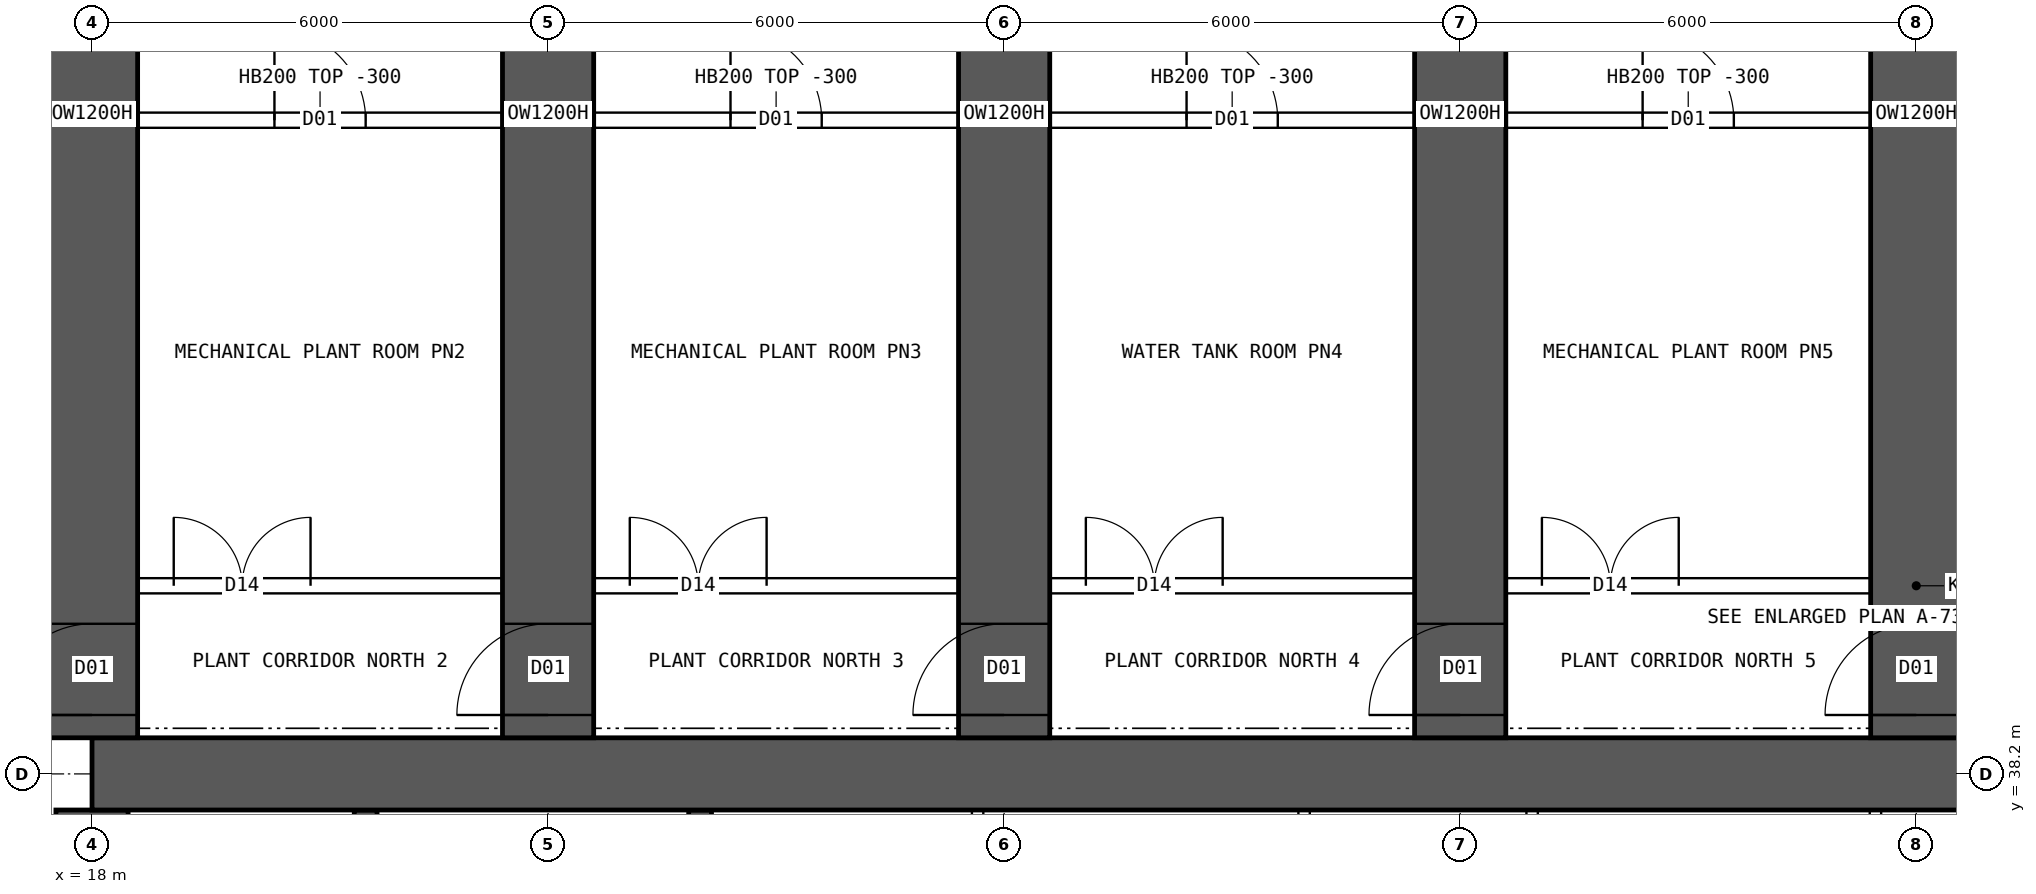
"""IFC4 building model, lengths in metres.
Left out: names, types, materials, properties, quantities, classifications, styles, units other than length and angle.
Written with IfcOpenShell. Run it as: python <this file> out.ifc"""

import sys

from ifc_helpers import new_model, si_unit, direction, frame, frame_2d, origin, place, context, subcontext, project, spatial, rectangle, extrude, element, fill, save


model = new_model("IFC4")
c1 = context("Model", 3, precision=1e-05, world=origin(), true_north=direction((0.0, 1.0)))
c2 = subcontext(c1, "Body", "Model", "MODEL_VIEW")
j1 = project(units=[si_unit("LENGTHUNIT", "METRE"), si_unit("PLANEANGLEUNIT", "RADIAN")], contexts=[c1])
p1 = place(None, origin())
s1 = spatial("IfcSite", under=j1, at=p1, CompositionType="ELEMENT")
p2 = place(p1, origin())
s2 = spatial("IfcBuilding", under=s1, at=p2, CompositionType="ELEMENT")
p3 = place(p2, frame((0.0, 0.0, 133.15)))
s3 = spatial("IfcBuildingStorey", under=s2, at=p3, CompositionType="ELEMENT", Elevation=133.15)
p4 = place(p3, frame((18.0, 38.2, 0.0), z_axis=(0.0, 0.0, 1.0), x_axis=(1.0, 0.0, 0.0)))
e1 = element("IfcWall", 1, at=p4, inside=s3, PredefinedType="SHEAR", context=c2, shape_type="SweptSolid", body=[
    extrude(rectangle(XDim=48.0, YDim=0.95, at=frame_2d((24.0, 0.0))), origin(), (0.0, 0.0, 1.0), 7.2),
])
p5 = place(p3, frame((18.0, 26.275, 0.0), z_axis=(0.0, 0.0, 1.0), x_axis=(0.0, 1.0, 0.0)))
e2 = element("IfcWall", 2, at=p5, inside=s3, PredefinedType="SHEAR", context=c2, shape_type="SweptSolid", body=[
    extrude(rectangle(XDim=11.45, YDim=0.95, at=frame_2d((5.725, 0.0))), origin(), (0.0, 0.0, 1.0), 7.2),
])
p6 = place(p5, frame((5.025, 0.0, 0.0)))
e3 = element("IfcOpeningElement", 3, at=p6, cuts=e2, PredefinedType="OPENING", context=c2, shape_type="SweptSolid", body=[
    extrude(rectangle(XDim=1.2, YDim=2.1, at=frame_2d((0.6, 1.05))), frame((0.0, 0.485, 0.0), z_axis=(0.0, -1.0, 0.0), x_axis=(1.0, 0.0, 0.0)), (0.0, 0.0, 1.0), 0.97),
])
for number, where, z_axis, x_axis in (
    (4, (21.6, 34.75, 0.0), (0.0, 0.0, 1.0), (0.0, 1.0, 0.0)),
    (5, (26.0, 34.75, 0.0), (0.0, 0.0, 1.0), (0.0, 1.0, 0.0)),
):
    element("IfcWall", number, at=place(p3, frame(where, z_axis=z_axis, x_axis=x_axis)), inside=s3, PredefinedType="SHEAR", context=c2, shape_type="SweptSolid", body=[
        extrude(rectangle(XDim=2.975, YDim=0.3, at=frame_2d((1.488, 0.0))), origin(), (0.0, 0.0, 1.0), 7.2),
    ])
p7 = place(p3, frame((18.0, 38.675, 0.0), z_axis=(0.0, 0.0, 1.0), x_axis=(0.0, 1.0, 0.0)))
e6 = element("IfcWall", 6, at=p7, inside=s3, PredefinedType="SHEAR", context=c2, shape_type="SweptSolid", body=[
    extrude(rectangle(XDim=16.425, YDim=1.2, at=frame_2d((8.212, 0.0))), origin(), (0.0, 0.0, 1.0), 7.2),
])
p8 = place(p7, frame((0.3, 0.0, 0.0)))
e7 = element("IfcOpeningElement", 7, at=p8, cuts=e6, PredefinedType="OPENING", context=c2, shape_type="SweptSolid", body=[
    extrude(rectangle(XDim=1.2, YDim=2.1, at=frame_2d((0.6, 1.05))), frame((0.0, 0.61, 0.0), z_axis=(0.0, -1.0, 0.0), x_axis=(1.0, 0.0, 0.0)), (0.0, 0.0, 1.0), 1.22),
])
p9 = place(p3, frame((24.0, 38.675, 0.0), z_axis=(0.0, 0.0, 1.0), x_axis=(0.0, 1.0, 0.0)))
e8 = element("IfcWall", 8, at=p9, inside=s3, PredefinedType="SHEAR", context=c2, shape_type="SweptSolid", body=[
    extrude(rectangle(XDim=16.425, YDim=1.2, at=frame_2d((8.212, 0.0))), origin(), (0.0, 0.0, 1.0), 7.2),
])
p10 = place(p9, frame((0.3, 0.0, 0.0)))
e9 = element("IfcOpeningElement", 9, at=p10, cuts=e8, PredefinedType="OPENING", context=c2, shape_type="SweptSolid", body=[
    extrude(rectangle(XDim=1.2, YDim=2.1, at=frame_2d((0.6, 1.05))), frame((0.0, 0.61, 0.0), z_axis=(0.0, -1.0, 0.0), x_axis=(1.0, 0.0, 0.0)), (0.0, 0.0, 1.0), 1.22),
])
p11 = place(p3, frame((30.0, 38.675, 0.0), z_axis=(0.0, 0.0, 1.0), x_axis=(0.0, 1.0, 0.0)))
e10 = element("IfcWall", 10, at=p11, inside=s3, PredefinedType="SHEAR", context=c2, shape_type="SweptSolid", body=[
    extrude(rectangle(XDim=16.425, YDim=1.2, at=frame_2d((8.212, 0.0))), origin(), (0.0, 0.0, 1.0), 7.2),
])
p12 = place(p11, frame((0.3, 0.0, 0.0)))
e11 = element("IfcOpeningElement", 11, at=p12, cuts=e10, PredefinedType="OPENING", context=c2, shape_type="SweptSolid", body=[
    extrude(rectangle(XDim=1.2, YDim=2.1, at=frame_2d((0.6, 1.05))), frame((0.0, 0.61, 0.0), z_axis=(0.0, -1.0, 0.0), x_axis=(1.0, 0.0, 0.0)), (0.0, 0.0, 1.0), 1.22),
])
p13 = place(p3, frame((36.0, 38.675, 0.0), z_axis=(0.0, 0.0, 1.0), x_axis=(0.0, 1.0, 0.0)))
e12 = element("IfcWall", 12, at=p13, inside=s3, PredefinedType="SHEAR", context=c2, shape_type="SweptSolid", body=[
    extrude(rectangle(XDim=16.425, YDim=1.2, at=frame_2d((8.212, 0.0))), origin(), (0.0, 0.0, 1.0), 7.2),
])
p14 = place(p13, frame((0.3, 0.0, 0.0)))
e13 = element("IfcOpeningElement", 13, at=p14, cuts=e12, PredefinedType="OPENING", context=c2, shape_type="SweptSolid", body=[
    extrude(rectangle(XDim=1.2, YDim=2.1, at=frame_2d((0.6, 1.05))), frame((0.0, 0.61, 0.0), z_axis=(0.0, -1.0, 0.0), x_axis=(1.0, 0.0, 0.0)), (0.0, 0.0, 1.0), 1.22),
])
p15 = place(p3, frame((42.0, 38.675, 0.0), z_axis=(0.0, 0.0, 1.0), x_axis=(0.0, 1.0, 0.0)))
e14 = element("IfcWall", 14, at=p15, inside=s3, PredefinedType="SHEAR", context=c2, shape_type="SweptSolid", body=[
    extrude(rectangle(XDim=16.425, YDim=1.2, at=frame_2d((8.212, 0.0))), origin(), (0.0, 0.0, 1.0), 7.2),
])
p16 = place(p15, frame((0.3, 0.0, 0.0)))
e15 = element("IfcOpeningElement", 15, at=p16, cuts=e14, PredefinedType="OPENING", context=c2, shape_type="SweptSolid", body=[
    extrude(rectangle(XDim=1.2, YDim=2.1, at=frame_2d((0.6, 1.05))), frame((0.0, 0.61, 0.0), z_axis=(0.0, -1.0, 0.0), x_axis=(1.0, 0.0, 0.0)), (0.0, 0.0, 1.0), 1.22),
])
for number, where, z_axis, x_axis in (
    (16, (29.651, 34.75, 0.0), (0.0, 0.0, 1.0), (0.0, 1.0, 0.0)),
    (17, (33.946, 34.75, 0.0), (0.0, 0.0, 1.0), (0.0, 1.0, 0.0)),
    (18, (36.946, 34.75, 0.0), (0.0, 0.0, 1.0), (0.0, 1.0, 0.0)),
    (19, (41.463, 34.75, 0.0), (0.0, 0.0, 1.0), (0.0, 1.0, 0.0)),
):
    element("IfcWall", number, at=place(p3, frame(where, z_axis=z_axis, x_axis=x_axis)), inside=s3, PredefinedType="SOLIDWALL", context=c2, shape_type="SweptSolid", body=[
        extrude(rectangle(XDim=2.975, YDim=0.15, at=frame_2d((1.488, 0.0))), origin(), (0.0, 0.0, 1.0), 6.9),
    ])
p17 = place(p3, frame((15.6, 40.675, 0.0), z_axis=(0.0, 0.0, 1.0), x_axis=(1.0, 0.0, 0.0)))
e20 = element("IfcWall", 20, at=p17, inside=s3, PredefinedType="SOLIDWALL", context=c2, shape_type="SweptSolid", body=[
    extrude(rectangle(XDim=52.8, YDim=0.2, at=frame_2d((26.4, 0.0))), origin(), (0.0, 0.0, 1.0), 6.9),
])
p18 = place(p17, frame((0.6, 0.0, 0.0)))
e21 = element("IfcOpeningElement", 21, at=p18, cuts=e20, PredefinedType="OPENING", context=c2, shape_type="SweptSolid", body=[
    extrude(rectangle(XDim=1.2, YDim=2.1, at=frame_2d((0.6, 1.05))), frame((0.0, 0.11, 0.0), z_axis=(0.0, -1.0, 0.0), x_axis=(1.0, 0.0, 0.0)), (0.0, 0.0, 1.0), 0.22),
])
p19 = place(p17, frame((3.475, 0.0, 0.0)))
e22 = element("IfcOpeningElement", 22, at=p19, cuts=e20, PredefinedType="OPENING", context=c2, shape_type="SweptSolid", body=[
    extrude(rectangle(XDim=1.8, YDim=2.4, at=frame_2d((0.9, 1.2))), frame((0.0, 0.11, 0.0), z_axis=(0.0, -1.0, 0.0), x_axis=(1.0, 0.0, 0.0)), (0.0, 0.0, 1.0), 0.22),
])
p20 = place(p17, frame((9.475, 0.0, 0.0)))
e23 = element("IfcOpeningElement", 23, at=p20, cuts=e20, PredefinedType="OPENING", context=c2, shape_type="SweptSolid", body=[
    extrude(rectangle(XDim=1.8, YDim=2.4, at=frame_2d((0.9, 1.2))), frame((0.0, 0.11, 0.0), z_axis=(0.0, -1.0, 0.0), x_axis=(1.0, 0.0, 0.0)), (0.0, 0.0, 1.0), 0.22),
])
p21 = place(p17, frame((15.475, 0.0, 0.0)))
e24 = element("IfcOpeningElement", 24, at=p21, cuts=e20, PredefinedType="OPENING", context=c2, shape_type="SweptSolid", body=[
    extrude(rectangle(XDim=1.8, YDim=2.4, at=frame_2d((0.9, 1.2))), frame((0.0, 0.11, 0.0), z_axis=(0.0, -1.0, 0.0), x_axis=(1.0, 0.0, 0.0)), (0.0, 0.0, 1.0), 0.22),
])
p22 = place(p17, frame((21.475, 0.0, 0.0)))
e25 = element("IfcOpeningElement", 25, at=p22, cuts=e20, PredefinedType="OPENING", context=c2, shape_type="SweptSolid", body=[
    extrude(rectangle(XDim=1.8, YDim=2.4, at=frame_2d((0.9, 1.2))), frame((0.0, 0.11, 0.0), z_axis=(0.0, -1.0, 0.0), x_axis=(1.0, 0.0, 0.0)), (0.0, 0.0, 1.0), 0.22),
])
p23 = place(p17, frame((27.475, 0.0, 0.0)))
e26 = element("IfcOpeningElement", 26, at=p23, cuts=e20, PredefinedType="OPENING", context=c2, shape_type="SweptSolid", body=[
    extrude(rectangle(XDim=1.8, YDim=2.4, at=frame_2d((0.9, 1.2))), frame((0.0, 0.11, 0.0), z_axis=(0.0, -1.0, 0.0), x_axis=(1.0, 0.0, 0.0)), (0.0, 0.0, 1.0), 0.22),
])
p24 = place(p17, frame((33.475, 0.0, 0.0)))
e27 = element("IfcOpeningElement", 27, at=p24, cuts=e20, PredefinedType="OPENING", context=c2, shape_type="SweptSolid", body=[
    extrude(rectangle(XDim=1.8, YDim=2.4, at=frame_2d((0.9, 1.2))), frame((0.0, 0.11, 0.0), z_axis=(0.0, -1.0, 0.0), x_axis=(1.0, 0.0, 0.0)), (0.0, 0.0, 1.0), 0.22),
])
p25 = place(p17, frame((39.475, 0.0, 0.0)))
e28 = element("IfcOpeningElement", 28, at=p25, cuts=e20, PredefinedType="OPENING", context=c2, shape_type="SweptSolid", body=[
    extrude(rectangle(XDim=1.8, YDim=2.4, at=frame_2d((0.9, 1.2))), frame((0.0, 0.11, 0.0), z_axis=(0.0, -1.0, 0.0), x_axis=(1.0, 0.0, 0.0)), (0.0, 0.0, 1.0), 0.22),
])
p26 = place(p17, frame((45.475, 0.0, 0.0)))
e29 = element("IfcOpeningElement", 29, at=p26, cuts=e20, PredefinedType="OPENING", context=c2, shape_type="SweptSolid", body=[
    extrude(rectangle(XDim=1.8, YDim=2.4, at=frame_2d((0.9, 1.2))), frame((0.0, 0.11, 0.0), z_axis=(0.0, -1.0, 0.0), x_axis=(1.0, 0.0, 0.0)), (0.0, 0.0, 1.0), 0.22),
])
p27 = place(p17, frame((51.475, 0.0, 0.0)))
e30 = element("IfcOpeningElement", 30, at=p27, cuts=e20, PredefinedType="OPENING", context=c2, shape_type="SweptSolid", body=[
    extrude(rectangle(XDim=1.2, YDim=2.1, at=frame_2d((0.6, 1.05))), frame((0.0, 0.11, 0.0), z_axis=(0.0, -1.0, 0.0), x_axis=(1.0, 0.0, 0.0)), (0.0, 0.0, 1.0), 0.22),
])
p28 = place(p3, frame((12.475, 46.8, 0.0), z_axis=(0.0, 0.0, 1.0), x_axis=(1.0, 0.0, 0.0)))
e31 = element("IfcWall", 31, at=p28, inside=s3, PredefinedType="SOLIDWALL", context=c2, shape_type="SweptSolid", body=[
    extrude(rectangle(XDim=5.05, YDim=0.2, at=frame_2d((2.525, 0.0))), origin(), (0.0, 0.0, 1.0), 6.9),
])
p29 = place(p28, frame((1.925, 0.0, 0.0)))
e32 = element("IfcOpeningElement", 32, at=p29, cuts=e31, PredefinedType="OPENING", context=c2, shape_type="SweptSolid", body=[
    extrude(rectangle(XDim=1.2, YDim=2.1, at=frame_2d((0.6, 1.05))), frame((0.0, 0.11, 0.0), z_axis=(0.0, -1.0, 0.0), x_axis=(1.0, 0.0, 0.0)), (0.0, 0.0, 1.0), 0.22),
])
p30 = place(p3, frame((18.475, 46.8, 0.0), z_axis=(0.0, 0.0, 1.0), x_axis=(1.0, 0.0, 0.0)))
e33 = element("IfcWall", 33, at=p30, inside=s3, PredefinedType="SOLIDWALL", context=c2, shape_type="SweptSolid", body=[
    extrude(rectangle(XDim=5.05, YDim=0.2, at=frame_2d((2.525, 0.0))), origin(), (0.0, 0.0, 1.0), 6.9),
])
p31 = place(p30, frame((1.925, 0.0, 0.0)))
e34 = element("IfcOpeningElement", 34, at=p31, cuts=e33, PredefinedType="OPENING", context=c2, shape_type="SweptSolid", body=[
    extrude(rectangle(XDim=1.2, YDim=2.1, at=frame_2d((0.6, 1.05))), frame((0.0, 0.11, 0.0), z_axis=(0.0, -1.0, 0.0), x_axis=(1.0, 0.0, 0.0)), (0.0, 0.0, 1.0), 0.22),
])
p32 = place(p3, frame((24.475, 46.8, 0.0), z_axis=(0.0, 0.0, 1.0), x_axis=(1.0, 0.0, 0.0)))
e35 = element("IfcWall", 35, at=p32, inside=s3, PredefinedType="SOLIDWALL", context=c2, shape_type="SweptSolid", body=[
    extrude(rectangle(XDim=5.05, YDim=0.2, at=frame_2d((2.525, 0.0))), origin(), (0.0, 0.0, 1.0), 6.9),
])
p33 = place(p32, frame((1.925, 0.0, 0.0)))
e36 = element("IfcOpeningElement", 36, at=p33, cuts=e35, PredefinedType="OPENING", context=c2, shape_type="SweptSolid", body=[
    extrude(rectangle(XDim=1.2, YDim=2.1, at=frame_2d((0.6, 1.05))), frame((0.0, 0.11, 0.0), z_axis=(0.0, -1.0, 0.0), x_axis=(1.0, 0.0, 0.0)), (0.0, 0.0, 1.0), 0.22),
])
p34 = place(p3, frame((30.475, 46.8, 0.0), z_axis=(0.0, 0.0, 1.0), x_axis=(1.0, 0.0, 0.0)))
e37 = element("IfcWall", 37, at=p34, inside=s3, PredefinedType="SOLIDWALL", context=c2, shape_type="SweptSolid", body=[
    extrude(rectangle(XDim=5.05, YDim=0.2, at=frame_2d((2.525, 0.0))), origin(), (0.0, 0.0, 1.0), 6.9),
])
p35 = place(p34, frame((1.925, 0.0, 0.0)))
e38 = element("IfcOpeningElement", 38, at=p35, cuts=e37, PredefinedType="OPENING", context=c2, shape_type="SweptSolid", body=[
    extrude(rectangle(XDim=1.2, YDim=2.1, at=frame_2d((0.6, 1.05))), frame((0.0, 0.11, 0.0), z_axis=(0.0, -1.0, 0.0), x_axis=(1.0, 0.0, 0.0)), (0.0, 0.0, 1.0), 0.22),
])
p36 = place(p3, frame((36.475, 46.8, 0.0), z_axis=(0.0, 0.0, 1.0), x_axis=(1.0, 0.0, 0.0)))
e39 = element("IfcWall", 39, at=p36, inside=s3, PredefinedType="SOLIDWALL", context=c2, shape_type="SweptSolid", body=[
    extrude(rectangle(XDim=5.05, YDim=0.2, at=frame_2d((2.525, 0.0))), origin(), (0.0, 0.0, 1.0), 6.9),
])
p37 = place(p36, frame((1.925, 0.0, 0.0)))
e40 = element("IfcOpeningElement", 40, at=p37, cuts=e39, PredefinedType="OPENING", context=c2, shape_type="SweptSolid", body=[
    extrude(rectangle(XDim=1.2, YDim=2.1, at=frame_2d((0.6, 1.05))), frame((0.0, 0.11, 0.0), z_axis=(0.0, -1.0, 0.0), x_axis=(1.0, 0.0, 0.0)), (0.0, 0.0, 1.0), 0.22),
])
p38 = place(p3, frame((42.475, 46.8, 0.0), z_axis=(0.0, 0.0, 1.0), x_axis=(1.0, 0.0, 0.0)))
e41 = element("IfcWall", 41, at=p38, inside=s3, PredefinedType="SOLIDWALL", context=c2, shape_type="SweptSolid", body=[
    extrude(rectangle(XDim=5.05, YDim=0.2, at=frame_2d((2.525, 0.0))), origin(), (0.0, 0.0, 1.0), 6.9),
])
p39 = place(p38, frame((1.925, 0.0, 0.0)))
e42 = element("IfcOpeningElement", 42, at=p39, cuts=e41, PredefinedType="OPENING", context=c2, shape_type="SweptSolid", body=[
    extrude(rectangle(XDim=1.2, YDim=2.1, at=frame_2d((0.6, 1.05))), frame((0.0, 0.11, 0.0), z_axis=(0.0, -1.0, 0.0), x_axis=(1.0, 0.0, 0.0)), (0.0, 0.0, 1.0), 0.22),
])
p40 = place(p31, origin())
e43 = element("IfcDoor", 43, at=p40, inside=s3, OperationType="SINGLE_SWING_LEFT", PredefinedType="DOOR", context=c2, shape_type="SweptSolid", body=[
    extrude(rectangle(XDim=1.2, YDim=2.1, at=frame_2d((0.6, 1.05))), frame((0.0, 0.025, 0.0), z_axis=(0.0, -1.0, 0.0), x_axis=(1.0, 0.0, 0.0)), (0.0, 0.0, 1.0), 0.05),
])
fill(e34, e43)
p41 = place(p33, origin())
e44 = element("IfcDoor", 44, at=p41, inside=s3, OperationType="SINGLE_SWING_LEFT", PredefinedType="DOOR", context=c2, shape_type="SweptSolid", body=[
    extrude(rectangle(XDim=1.2, YDim=2.1, at=frame_2d((0.6, 1.05))), frame((0.0, 0.025, 0.0), z_axis=(0.0, -1.0, 0.0), x_axis=(1.0, 0.0, 0.0)), (0.0, 0.0, 1.0), 0.05),
])
fill(e36, e44)
p42 = place(p35, origin())
e45 = element("IfcDoor", 45, at=p42, inside=s3, OperationType="SINGLE_SWING_LEFT", PredefinedType="DOOR", context=c2, shape_type="SweptSolid", body=[
    extrude(rectangle(XDim=1.2, YDim=2.1, at=frame_2d((0.6, 1.05))), frame((0.0, 0.025, 0.0), z_axis=(0.0, -1.0, 0.0), x_axis=(1.0, 0.0, 0.0)), (0.0, 0.0, 1.0), 0.05),
])
fill(e38, e45)
p43 = place(p37, origin())
e46 = element("IfcDoor", 46, at=p43, inside=s3, OperationType="SINGLE_SWING_LEFT", PredefinedType="DOOR", context=c2, shape_type="SweptSolid", body=[
    extrude(rectangle(XDim=1.2, YDim=2.1, at=frame_2d((0.6, 1.05))), frame((0.0, 0.025, 0.0), z_axis=(0.0, -1.0, 0.0), x_axis=(1.0, 0.0, 0.0)), (0.0, 0.0, 1.0), 0.05),
])
fill(e40, e46)
p44 = place(p19, origin())
e47 = element("IfcDoor", 47, at=p44, inside=s3, OperationType="DOUBLE_DOOR_SINGLE_SWING", PredefinedType="DOOR", context=c2, shape_type="SweptSolid", body=[
    extrude(rectangle(XDim=1.8, YDim=2.4, at=frame_2d((0.9, 1.2))), frame((0.0, 0.025, 0.0), z_axis=(0.0, -1.0, 0.0), x_axis=(1.0, 0.0, 0.0)), (0.0, 0.0, 1.0), 0.05),
])
fill(e22, e47)
p45 = place(p20, origin())
e48 = element("IfcDoor", 48, at=p45, inside=s3, OperationType="DOUBLE_DOOR_SINGLE_SWING", PredefinedType="DOOR", context=c2, shape_type="SweptSolid", body=[
    extrude(rectangle(XDim=1.8, YDim=2.4, at=frame_2d((0.9, 1.2))), frame((0.0, 0.025, 0.0), z_axis=(0.0, -1.0, 0.0), x_axis=(1.0, 0.0, 0.0)), (0.0, 0.0, 1.0), 0.05),
])
fill(e23, e48)
p46 = place(p21, origin())
e49 = element("IfcDoor", 49, at=p46, inside=s3, OperationType="DOUBLE_DOOR_SINGLE_SWING", PredefinedType="DOOR", context=c2, shape_type="SweptSolid", body=[
    extrude(rectangle(XDim=1.8, YDim=2.4, at=frame_2d((0.9, 1.2))), frame((0.0, 0.025, 0.0), z_axis=(0.0, -1.0, 0.0), x_axis=(1.0, 0.0, 0.0)), (0.0, 0.0, 1.0), 0.05),
])
fill(e24, e49)
p47 = place(p22, origin())
e50 = element("IfcDoor", 50, at=p47, inside=s3, OperationType="DOUBLE_DOOR_SINGLE_SWING", PredefinedType="DOOR", context=c2, shape_type="SweptSolid", body=[
    extrude(rectangle(XDim=1.8, YDim=2.4, at=frame_2d((0.9, 1.2))), frame((0.0, 0.025, 0.0), z_axis=(0.0, -1.0, 0.0), x_axis=(1.0, 0.0, 0.0)), (0.0, 0.0, 1.0), 0.05),
])
fill(e25, e50)
p48 = place(p8, origin())
e51 = element("IfcDoor", 51, at=p48, inside=s3, OperationType="SINGLE_SWING_LEFT", PredefinedType="DOOR", context=c2, shape_type="SweptSolid", body=[
    extrude(rectangle(XDim=1.2, YDim=2.1, at=frame_2d((0.6, 1.05))), frame((0.0, 0.025, 0.0), z_axis=(0.0, -1.0, 0.0), x_axis=(1.0, 0.0, 0.0)), (0.0, 0.0, 1.0), 0.05),
])
fill(e7, e51)
p49 = place(p10, origin())
e52 = element("IfcDoor", 52, at=p49, inside=s3, OperationType="SINGLE_SWING_LEFT", PredefinedType="DOOR", context=c2, shape_type="SweptSolid", body=[
    extrude(rectangle(XDim=1.2, YDim=2.1, at=frame_2d((0.6, 1.05))), frame((0.0, 0.025, 0.0), z_axis=(0.0, -1.0, 0.0), x_axis=(1.0, 0.0, 0.0)), (0.0, 0.0, 1.0), 0.05),
])
fill(e9, e52)
p50 = place(p12, origin())
e53 = element("IfcDoor", 53, at=p50, inside=s3, OperationType="SINGLE_SWING_LEFT", PredefinedType="DOOR", context=c2, shape_type="SweptSolid", body=[
    extrude(rectangle(XDim=1.2, YDim=2.1, at=frame_2d((0.6, 1.05))), frame((0.0, 0.025, 0.0), z_axis=(0.0, -1.0, 0.0), x_axis=(1.0, 0.0, 0.0)), (0.0, 0.0, 1.0), 0.05),
])
fill(e11, e53)
p51 = place(p14, origin())
e54 = element("IfcDoor", 54, at=p51, inside=s3, OperationType="SINGLE_SWING_LEFT", PredefinedType="DOOR", context=c2, shape_type="SweptSolid", body=[
    extrude(rectangle(XDim=1.2, YDim=2.1, at=frame_2d((0.6, 1.05))), frame((0.0, 0.025, 0.0), z_axis=(0.0, -1.0, 0.0), x_axis=(1.0, 0.0, 0.0)), (0.0, 0.0, 1.0), 0.05),
])
fill(e13, e54)
p52 = place(p16, origin())
e55 = element("IfcDoor", 55, at=p52, inside=s3, OperationType="SINGLE_SWING_LEFT", PredefinedType="DOOR", context=c2, shape_type="SweptSolid", body=[
    extrude(rectangle(XDim=1.2, YDim=2.1, at=frame_2d((0.6, 1.05))), frame((0.0, 0.025, 0.0), z_axis=(0.0, -1.0, 0.0), x_axis=(1.0, 0.0, 0.0)), (0.0, 0.0, 1.0), 0.05),
])
fill(e15, e55)
save(model, sys.argv[1])
